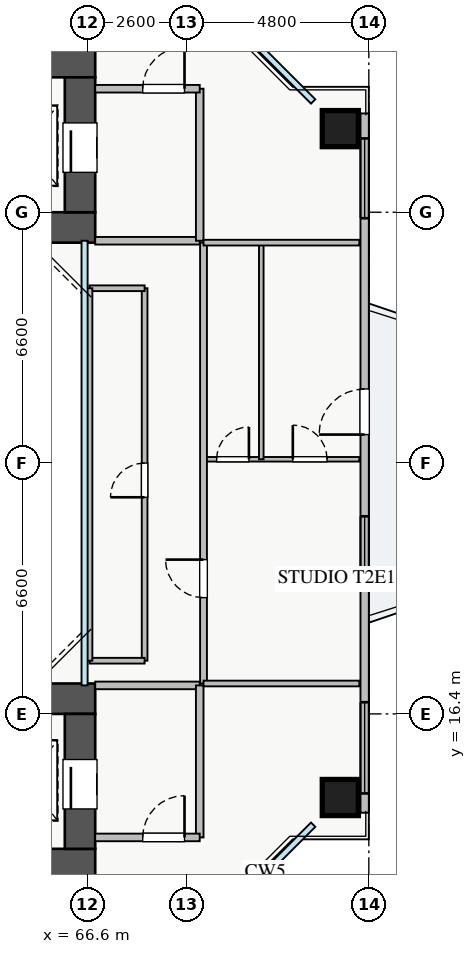
"""IFC4 building model, lengths in metres.
Left out: names, types, materials, properties, quantities, classifications, styles, units other than length and angle.
Written with IfcOpenShell. Run it as: python <this file> out.ifc"""

import sys

from ifc_helpers import new_model, si_unit, direction, frame, frame_2d, origin, origin_2d, place, context, subcontext, project, spatial, rectangle, extrude, source, transform, mapped, element, fill, save


model = new_model("IFC4")
c1 = context("Model", 3, precision=1e-05, world=origin(), true_north=direction((0.0, 1.0)))
c2 = subcontext(c1, "Body", "Model", "MODEL_VIEW")
j1 = project(units=[si_unit("LENGTHUNIT", "METRE"), si_unit("PLANEANGLEUNIT", "RADIAN")], contexts=[c1])
p1 = place(None, origin())
s1 = spatial("IfcSite", under=j1, at=p1, CompositionType="ELEMENT")
p2 = place(p1, origin())
s2 = spatial("IfcBuilding", under=s1, at=p2, CompositionType="ELEMENT")
p3 = place(p2, frame((0.0, 0.0, 56.75)))
s3 = spatial("IfcBuildingStorey", under=s2, at=p3, CompositionType="ELEMENT", Elevation=56.75)
p4 = place(p3, frame((54.2, 29.2, 0.0), z_axis=(0.0, 0.0, 1.0), x_axis=(1.0, 0.0, 0.0)))
e1 = element("IfcWall", 1, at=p4, inside=s3, PredefinedType="SHEAR", context=c2, shape_type="SweptSolid", body=[
    extrude(rectangle(XDim=12.6, YDim=0.8, at=frame_2d((6.3, 0.0))), origin(), (0.0, 0.0, 1.0), 3.25),
])
p5 = place(p3, frame((54.2, 33.55, 0.0), z_axis=(0.0, 0.0, 1.0), x_axis=(1.0, 0.0, 0.0)))
e2 = element("IfcWall", 2, at=p5, inside=s3, PredefinedType="SHEAR", context=c2, shape_type="SweptSolid", body=[
    extrude(rectangle(XDim=12.6, YDim=0.8, at=frame_2d((6.3, 0.0))), origin(), (0.0, 0.0, 1.0), 3.25),
])
p6 = place(p5, frame((8.2, 0.0, 0.0)))
e3 = element("IfcOpeningElement", 3, at=p6, cuts=e2, PredefinedType="OPENING", context=c2, shape_type="SweptSolid", body=[
    extrude(rectangle(XDim=1.1, YDim=2.05, at=frame_2d((0.55, 1.025))), frame((0.0, 0.41, 0.0), z_axis=(0.0, -1.0, 0.0), x_axis=(1.0, 0.0, 0.0)), (0.0, 0.0, 1.0), 0.82),
])
p7 = place(p3, frame((66.4, 29.6, 0.0), z_axis=(0.0, 0.0, 1.0), x_axis=(0.0, 1.0, 0.0)))
e4 = element("IfcWall", 4, at=p7, inside=s3, PredefinedType="SHEAR", context=c2, shape_type="SweptSolid", body=[
    extrude(rectangle(XDim=3.55, YDim=0.8, at=frame_2d((1.775, 0.0))), origin(), (0.0, 0.0, 1.0), 3.25),
])
p8 = place(p7, frame((1.05, 0.0, 0.0)))
e5 = element("IfcOpeningElement", 5, at=p8, cuts=e4, PredefinedType="OPENING", context=c2, shape_type="SweptSolid", body=[
    extrude(rectangle(XDim=1.3, YDim=2.05, at=frame_2d((0.65, 1.025))), frame((0.0, 0.41, 0.0), z_axis=(0.0, -1.0, 0.0), x_axis=(1.0, 0.0, 0.0)), (0.0, 0.0, 1.0), 0.82),
])
p9 = place(p3, frame((54.2, 12.45, 0.0), z_axis=(0.0, 0.0, 1.0), x_axis=(1.0, 0.0, 0.0)))
e6 = element("IfcWall", 6, at=p9, inside=s3, PredefinedType="SHEAR", context=c2, shape_type="SweptSolid", body=[
    extrude(rectangle(XDim=12.6, YDim=0.8, at=frame_2d((6.3, 0.0))), origin(), (0.0, 0.0, 1.0), 3.25),
])
p10 = place(p9, frame((8.2, 0.0, 0.0)))
e7 = element("IfcOpeningElement", 7, at=p10, cuts=e6, PredefinedType="OPENING", context=c2, shape_type="SweptSolid", body=[
    extrude(rectangle(XDim=1.1, YDim=2.05, at=frame_2d((0.55, 1.025))), frame((0.0, 0.41, 0.0), z_axis=(0.0, -1.0, 0.0), x_axis=(1.0, 0.0, 0.0)), (0.0, 0.0, 1.0), 0.82),
])
p11 = place(p3, frame((54.2, 16.8, 0.0), z_axis=(0.0, 0.0, 1.0), x_axis=(1.0, 0.0, 0.0)))
e8 = element("IfcWall", 8, at=p11, inside=s3, PredefinedType="SHEAR", context=c2, shape_type="SweptSolid", body=[
    extrude(rectangle(XDim=12.6, YDim=0.8, at=frame_2d((6.3, 0.0))), origin(), (0.0, 0.0, 1.0), 3.25),
])
p12 = place(p3, frame((66.4, 12.85, 0.0), z_axis=(0.0, 0.0, 1.0), x_axis=(0.0, 1.0, 0.0)))
e9 = element("IfcWall", 9, at=p12, inside=s3, PredefinedType="SHEAR", context=c2, shape_type="SweptSolid", body=[
    extrude(rectangle(XDim=3.55, YDim=0.8, at=frame_2d((1.775, 0.0))), origin(), (0.0, 0.0, 1.0), 3.25),
])
p13 = place(p12, frame((1.05, 0.0, 0.0)))
e10 = element("IfcOpeningElement", 10, at=p13, cuts=e9, PredefinedType="OPENING", context=c2, shape_type="SweptSolid", body=[
    extrude(rectangle(XDim=1.3, YDim=2.05, at=frame_2d((0.65, 1.025))), frame((0.0, 0.41, 0.0), z_axis=(0.0, -1.0, 0.0), x_axis=(1.0, 0.0, 0.0)), (0.0, 0.0, 1.0), 0.82),
])
m1 = source(origin(), c2, "Body", "SweptSolid", [
    extrude(rectangle(XDim=0.95, YDim=0.95, at=origin_2d()), origin(), (0.0, 0.0, 1.0), 3.25),
])
for number, where, z_axis, x_axis in (
    (11, (73.25, 14.2, 0.0), (0.0, 0.0, 1.0), (1.0, 0.0, 0.0)),
    (12, (73.25, 31.8, 0.0), (0.0, 0.0, 1.0), (1.0, 0.0, 0.0)),
):
    element("IfcColumn", number, at=place(p3, frame(where, z_axis=z_axis, x_axis=x_axis)), inside=s3, PredefinedType="COLUMN", context=c2, shape_type="MappedRepresentation", body=[
        mapped(m1, transform((0.0, 0.0, 0.0), x_axis=(1.0, 0.0, 0.0), y_axis=(0.0, 1.0, 0.0), z_axis=(0.0, 0.0, 1.0), scale=1.0)),
    ])
p14 = place(p3, frame((73.89, 13.8, 0.0), z_axis=(0.0, 0.0, 1.0), x_axis=(0.0, 1.0, 0.0)))
e13 = element("IfcWall", 13, at=p14, inside=s3, PredefinedType="STANDARD", context=c2, shape_type="SweptSolid", body=[
    extrude(rectangle(XDim=18.4, YDim=0.22, at=frame_2d((9.2, 0.0))), origin(), (0.0, 0.0, 1.0), 2.61),
])
p15 = place(p14, frame((9.95, 0.0, 0.0)))
e14 = element("IfcOpeningElement", 14, at=p15, cuts=e13, PredefinedType="OPENING", context=c2, shape_type="SweptSolid", body=[
    extrude(rectangle(XDim=1.2, YDim=2.1, at=frame_2d((0.6, 1.05))), frame((0.0, 0.12, 0.0), z_axis=(0.0, -1.0, 0.0), x_axis=(1.0, 0.0, 0.0)), (0.0, 0.0, 1.0), 0.24),
])
p16 = place(p14, frame((0.508, 0.0, 0.9)))
e15 = element("IfcOpeningElement", 15, at=p16, cuts=e13, PredefinedType="OPENING", context=c2, shape_type="SweptSolid", body=[
    extrude(rectangle(XDim=2.4, YDim=1.5, at=frame_2d((1.2, 0.75))), frame((0.0, 0.12, 0.0), z_axis=(0.0, -1.0, 0.0), x_axis=(1.0, 0.0, 0.0)), (0.0, 0.0, 1.0), 0.24),
])
p17 = place(p14, frame((6.0, 0.0, 0.9)))
e16 = element("IfcOpeningElement", 16, at=p17, cuts=e13, PredefinedType="OPENING", context=c2, shape_type="SweptSolid", body=[
    extrude(rectangle(XDim=1.8, YDim=1.45, at=frame_2d((0.9, 0.725))), frame((0.0, 0.12, 0.0), z_axis=(0.0, -1.0, 0.0), x_axis=(1.0, 0.0, 0.0)), (0.0, 0.0, 1.0), 0.24),
])
p18 = place(p14, frame((15.643, 0.0, 0.9)))
e17 = element("IfcOpeningElement", 17, at=p18, cuts=e13, PredefinedType="OPENING", context=c2, shape_type="SweptSolid", body=[
    extrude(rectangle(XDim=2.1, YDim=1.5, at=frame_2d((1.05, 0.75))), frame((0.0, 0.12, 0.0), z_axis=(0.0, -1.0, 0.0), x_axis=(1.0, 0.0, 0.0)), (0.0, 0.0, 1.0), 0.24),
])
p19 = place(p3, frame((66.8, 28.85, 0.0), z_axis=(0.0, 0.0, 1.0), x_axis=(1.0, 0.0, 0.0)))
e18 = element("IfcWall", 18, at=p19, inside=s3, PredefinedType="PARTITIONING", context=c2, shape_type="SweptSolid", body=[
    extrude(rectangle(XDim=2.75, YDim=0.2, at=frame_2d((1.375, 0.0))), origin(), (0.0, 0.0, 1.0), 3.07),
])
p20 = place(p3, frame((69.55, 28.85, 0.0), z_axis=(0.0, 0.0, 1.0), x_axis=(0.0, 1.0, 0.0)))
e19 = element("IfcWall", 19, at=p20, inside=s3, PredefinedType="PARTITIONING", context=c2, shape_type="SweptSolid", body=[
    extrude(rectangle(XDim=4.0, YDim=0.2, at=frame_2d((2.0, 0.0))), origin(), (0.0, 0.0, 1.0), 2.615),
])
p21 = place(p3, frame((66.8, 32.85, 0.0), z_axis=(0.0, 0.0, 1.0), x_axis=(1.0, 0.0, 0.0)))
e20 = element("IfcWall", 20, at=p21, inside=s3, PredefinedType="PARTITIONING", context=c2, shape_type="SweptSolid", body=[
    extrude(rectangle(XDim=2.75, YDim=0.2, at=frame_2d((1.375, 0.0))), origin(), (0.0, 0.0, 1.0), 3.07),
])
p22 = place(p21, frame((1.25, 0.0, 0.0)))
e21 = element("IfcOpeningElement", 21, at=p22, cuts=e20, PredefinedType="OPENING", context=c2, shape_type="SweptSolid", body=[
    extrude(rectangle(XDim=1.1, YDim=2.05, at=frame_2d((0.55, 1.025))), frame((0.0, 0.11, 0.0), z_axis=(0.0, -1.0, 0.0), x_axis=(1.0, 0.0, 0.0)), (0.0, 0.0, 1.0), 0.22),
])
p23 = place(p3, frame((66.8, 17.15, 0.0), z_axis=(0.0, 0.0, 1.0), x_axis=(1.0, 0.0, 0.0)))
e22 = element("IfcWall", 22, at=p23, inside=s3, PredefinedType="PARTITIONING", context=c2, shape_type="SweptSolid", body=[
    extrude(rectangle(XDim=2.75, YDim=0.2, at=frame_2d((1.375, 0.0))), origin(), (0.0, 0.0, 1.0), 3.07),
])
p24 = place(p3, frame((69.55, 13.15, 0.0), z_axis=(0.0, 0.0, 1.0), x_axis=(0.0, 1.0, 0.0)))
e23 = element("IfcWall", 23, at=p24, inside=s3, PredefinedType="PARTITIONING", context=c2, shape_type="SweptSolid", body=[
    extrude(rectangle(XDim=4.0, YDim=0.2, at=frame_2d((2.0, 0.0))), origin(), (0.0, 0.0, 1.0), 2.615),
])
p25 = place(p3, frame((66.8, 13.15, 0.0), z_axis=(0.0, 0.0, 1.0), x_axis=(1.0, 0.0, 0.0)))
e24 = element("IfcWall", 24, at=p25, inside=s3, PredefinedType="PARTITIONING", context=c2, shape_type="SweptSolid", body=[
    extrude(rectangle(XDim=2.75, YDim=0.2, at=frame_2d((1.375, 0.0))), origin(), (0.0, 0.0, 1.0), 3.07),
])
p26 = place(p25, frame((1.25, 0.0, 0.0)))
e25 = element("IfcOpeningElement", 25, at=p26, cuts=e24, PredefinedType="OPENING", context=c2, shape_type="SweptSolid", body=[
    extrude(rectangle(XDim=1.1, YDim=2.05, at=frame_2d((0.55, 1.025))), frame((0.0, 0.11, 0.0), z_axis=(0.0, -1.0, 0.0), x_axis=(1.0, 0.0, 0.0)), (0.0, 0.0, 1.0), 0.22),
])
p27 = place(p3, frame((69.65, 23.1, 0.0), z_axis=(0.0, 0.0, 1.0), x_axis=(1.0, 0.0, 0.0)))
e26 = element("IfcWall", 26, at=p27, inside=s3, PredefinedType="PLUMBINGWALL", context=c2, shape_type="SweptSolid", body=[
    extrude(rectangle(XDim=4.1, YDim=0.12, at=frame_2d((2.05, 0.0))), origin(), (0.0, 0.0, 1.0), 2.715),
])
p28 = place(p27, frame((0.345, 0.0, 0.0)))
e27 = element("IfcOpeningElement", 27, at=p28, cuts=e26, PredefinedType="OPENING", context=c2, shape_type="SweptSolid", body=[
    extrude(rectangle(XDim=0.85, YDim=2.05, at=frame_2d((0.425, 1.025))), frame((0.0, 0.07, 0.0), z_axis=(0.0, -1.0, 0.0), x_axis=(1.0, 0.0, 0.0)), (0.0, 0.0, 1.0), 0.14),
])
p29 = place(p27, frame((2.35, 0.0, 0.0)))
e28 = element("IfcOpeningElement", 28, at=p29, cuts=e26, PredefinedType="OPENING", context=c2, shape_type="SweptSolid", body=[
    extrude(rectangle(XDim=0.9, YDim=2.05, at=frame_2d((0.45, 1.025))), frame((0.0, 0.07, 0.0), z_axis=(0.0, -1.0, 0.0), x_axis=(1.0, 0.0, 0.0)), (0.0, 0.0, 1.0), 0.14),
])
p30 = place(p3, frame((71.17, 23.1, 0.0), z_axis=(0.0, 0.0, 1.0), x_axis=(0.0, 1.0, 0.0)))
e29 = element("IfcWall", 29, at=p30, inside=s3, PredefinedType="PLUMBINGWALL", context=c2, shape_type="SweptSolid", body=[
    extrude(rectangle(XDim=5.7, YDim=0.12, at=frame_2d((2.85, 0.0))), origin(), (0.0, 0.0, 1.0), 3.07),
])
p31 = place(p3, frame((69.65, 17.2, 0.0), z_axis=(0.0, 0.0, 1.0), x_axis=(0.0, 1.0, 0.0)))
e30 = element("IfcWall", 30, at=p31, inside=s3, PredefinedType="PARTITIONING", context=c2, shape_type="SweptSolid", body=[
    extrude(rectangle(XDim=11.6, YDim=0.18, at=frame_2d((5.8, 0.0))), origin(), (0.0, 0.0, 1.0), 3.07),
])
p32 = place(p31, frame((2.26, 0.0, 0.0)))
e31 = element("IfcOpeningElement", 31, at=p32, cuts=e30, PredefinedType="OPENING", context=c2, shape_type="SweptSolid", body=[
    extrude(rectangle(XDim=1.0, YDim=2.05, at=frame_2d((0.5, 1.025))), frame((0.0, 0.1, 0.0), z_axis=(0.0, -1.0, 0.0), x_axis=(1.0, 0.0, 0.0)), (0.0, 0.0, 1.0), 0.2),
])
for number, where, z_axis, x_axis in (
    (32, (69.65, 17.2, 0.0), (0.0, 0.0, 1.0), (1.0, 0.0, 0.0)),
    (33, (69.65, 28.8, 0.0), (0.0, 0.0, 1.0), (1.0, 0.0, 0.0)),
):
    element("IfcWall", number, at=place(p3, frame(where, z_axis=z_axis, x_axis=x_axis)), inside=s3, PredefinedType="PARTITIONING", context=c2, shape_type="SweptSolid", body=[
        extrude(rectangle(XDim=4.1, YDim=0.15, at=frame_2d((2.05, 0.0))), origin(), (0.0, 0.0, 1.0), 3.07),
    ])
p33 = place(p3, frame((68.1, 17.8, 0.0), z_axis=(0.0, 0.0, 1.0), x_axis=(0.0, 1.0, 0.0)))
e34 = element("IfcWall", 34, at=p33, inside=s3, PredefinedType="PARTITIONING", context=c2, shape_type="SweptSolid", body=[
    extrude(rectangle(XDim=9.8, YDim=0.15, at=frame_2d((4.9, 0.0))), origin(), (0.0, 0.0, 1.0), 3.07),
])
p34 = place(p33, frame((4.3, 0.0, 0.0)))
e35 = element("IfcOpeningElement", 35, at=p34, cuts=e34, PredefinedType="OPENING", context=c2, shape_type="SweptSolid", body=[
    extrude(rectangle(XDim=0.9, YDim=2.05, at=frame_2d((0.45, 1.025))), frame((0.0, 0.085, 0.0), z_axis=(0.0, -1.0, 0.0), x_axis=(1.0, 0.0, 0.0)), (0.0, 0.0, 1.0), 0.17),
])
p35 = place(p3, frame((66.65, 27.6, 0.0), z_axis=(0.0, 0.0, 1.0), x_axis=(1.0, 0.0, 0.0)))
e36 = element("IfcWall", 36, at=p35, inside=s3, PredefinedType="PARTITIONING", context=c2, shape_type="SweptSolid", body=[
    extrude(rectangle(XDim=1.45, YDim=0.15, at=frame_2d((0.725, 0.0))), origin(), (0.0, 0.0, 1.0), 2.715),
])
p36 = place(p3, frame((66.65, 17.8, 0.0), z_axis=(0.0, 0.0, 1.0), x_axis=(1.0, 0.0, 0.0)))
e37 = element("IfcWall", 37, at=p36, inside=s3, PredefinedType="PARTITIONING", context=c2, shape_type="SweptSolid", body=[
    extrude(rectangle(XDim=1.45, YDim=0.15, at=frame_2d((0.725, 0.0))), origin(), (0.0, 0.0, 1.0), 3.07),
])
p37 = place(p3, frame((66.65, 17.8, 0.0), z_axis=(0.0, 0.0, 1.0), x_axis=(0.0, 1.0, 0.0)))
e38 = element("IfcWall", 38, at=p37, inside=s3, PredefinedType="PARTITIONING", context=c2, shape_type="SweptSolid", body=[
    extrude(rectangle(XDim=9.8, YDim=0.15, at=frame_2d((4.9, 0.0))), origin(), (0.0, 0.0, 1.0), 2.665),
])
m2 = source(origin(), c2, "Body", "SweptSolid", [
    extrude(rectangle(XDim=1.2, YDim=2.1, at=frame_2d((0.6, 1.05))), frame((0.0, 0.025, 0.0), z_axis=(0.0, -1.0, 0.0), x_axis=(1.0, 0.0, 0.0)), (0.0, 0.0, 1.0), 0.05),
])
p38 = place(p15, origin())
e39 = element("IfcDoor", 39, at=p38, inside=s3, OperationType="SINGLE_SWING_LEFT", PredefinedType="DOOR", context=c2, shape_type="MappedRepresentation", body=[
    mapped(m2, transform((0.0, 0.0, 0.0), x_axis=(1.0, 0.0, 0.0), y_axis=(0.0, 1.0, 0.0), z_axis=(0.0, 0.0, 1.0), scale=1.0)),
])
fill(e14, e39)
m3 = source(origin(), c2, "Body", "SweptSolid", [
    extrude(rectangle(XDim=2.4, YDim=1.5, at=frame_2d((1.2, 0.75))), frame((0.0, 0.03, 0.0), z_axis=(0.0, -1.0, 0.0), x_axis=(1.0, 0.0, 0.0)), (0.0, 0.0, 1.0), 0.06),
])
p39 = place(p16, origin())
e40 = element("IfcWindow", 40, at=p39, inside=s3, PartitioningType="TRIPLE_PANEL_VERTICAL", PredefinedType="WINDOW", context=c2, shape_type="MappedRepresentation", body=[
    mapped(m3, transform((0.0, 0.0, 0.0), x_axis=(1.0, 0.0, 0.0), y_axis=(0.0, 1.0, 0.0), z_axis=(0.0, 0.0, 1.0), scale=1.0)),
])
fill(e15, e40)
m4 = source(origin(), c2, "Body", "SweptSolid", [
    extrude(rectangle(XDim=1.8, YDim=1.45, at=frame_2d((0.9, 0.725))), frame((0.0, 0.03, 0.0), z_axis=(0.0, -1.0, 0.0), x_axis=(1.0, 0.0, 0.0)), (0.0, 0.0, 1.0), 0.06),
])
p40 = place(p17, origin())
e41 = element("IfcWindow", 41, at=p40, inside=s3, PartitioningType="DOUBLE_PANEL_VERTICAL", PredefinedType="WINDOW", context=c2, shape_type="MappedRepresentation", body=[
    mapped(m4, transform((0.0, 0.0, 0.0), x_axis=(1.0, 0.0, 0.0), y_axis=(0.0, 1.0, 0.0), z_axis=(0.0, 0.0, 1.0), scale=1.0)),
])
fill(e16, e41)
m5 = source(origin(), c2, "Body", "SweptSolid", [
    extrude(rectangle(XDim=2.1, YDim=1.5, at=frame_2d((1.05, 0.75))), frame((0.0, 0.03, 0.0), z_axis=(0.0, -1.0, 0.0), x_axis=(1.0, 0.0, 0.0)), (0.0, 0.0, 1.0), 0.06),
])
p41 = place(p18, origin())
e42 = element("IfcWindow", 42, at=p41, inside=s3, PartitioningType="TRIPLE_PANEL_VERTICAL", PredefinedType="WINDOW", context=c2, shape_type="MappedRepresentation", body=[
    mapped(m5, transform((0.0, 0.0, 0.0), x_axis=(1.0, 0.0, 0.0), y_axis=(0.0, 1.0, 0.0), z_axis=(0.0, 0.0, 1.0), scale=1.0)),
])
fill(e17, e42)
m6 = source(origin(), c2, "Body", "SweptSolid", [
    extrude(rectangle(XDim=1.3, YDim=2.05, at=frame_2d((0.65, 1.025))), frame((0.0, 0.025, 0.0), z_axis=(0.0, -1.0, 0.0), x_axis=(1.0, 0.0, 0.0)), (0.0, 0.0, 1.0), 0.05),
])
p42 = place(p8, origin())
e43 = element("IfcDoor", 43, at=p42, inside=s3, OperationType="SLIDING_TO_LEFT", PredefinedType="DOOR", context=c2, shape_type="MappedRepresentation", body=[
    mapped(m6, transform((0.0, 0.0, 0.0), x_axis=(1.0, 0.0, 0.0), y_axis=(0.0, 1.0, 0.0), z_axis=(0.0, 0.0, 1.0), scale=1.0)),
])
fill(e5, e43)
p43 = place(p13, origin())
e44 = element("IfcDoor", 44, at=p43, inside=s3, OperationType="SLIDING_TO_RIGHT", PredefinedType="DOOR", context=c2, shape_type="MappedRepresentation", body=[
    mapped(m6, transform((0.0, 0.0, 0.0), x_axis=(1.0, 0.0, 0.0), y_axis=(0.0, 1.0, 0.0), z_axis=(0.0, 0.0, 1.0), scale=1.0)),
])
fill(e10, e44)
m7 = source(origin(), c2, "Body", "SweptSolid", [
    extrude(rectangle(XDim=1.1, YDim=2.05, at=frame_2d((0.55, 1.025))), frame((0.0, 0.025, 0.0), z_axis=(0.0, -1.0, 0.0), x_axis=(1.0, 0.0, 0.0)), (0.0, 0.0, 1.0), 0.05),
])
p44 = place(p22, origin())
e45 = element("IfcDoor", 45, at=p44, inside=s3, OperationType="SINGLE_SWING_RIGHT", PredefinedType="DOOR", context=c2, shape_type="MappedRepresentation", body=[
    mapped(m7, transform((0.0, 0.0, 0.0), x_axis=(1.0, 0.0, 0.0), y_axis=(0.0, 1.0, 0.0), z_axis=(0.0, 0.0, 1.0), scale=1.0)),
])
fill(e21, e45)
p45 = place(p26, origin())
e46 = element("IfcDoor", 46, at=p45, inside=s3, OperationType="SINGLE_SWING_RIGHT", PredefinedType="DOOR", context=c2, shape_type="MappedRepresentation", body=[
    mapped(m7, transform((0.0, 0.0, 0.0), x_axis=(1.0, 0.0, 0.0), y_axis=(0.0, 1.0, 0.0), z_axis=(0.0, 0.0, 1.0), scale=1.0)),
])
fill(e25, e46)
m8 = source(origin(), c2, "Body", "SweptSolid", [
    extrude(rectangle(XDim=0.85, YDim=2.05, at=frame_2d((0.425, 1.025))), frame((0.0, 0.025, 0.0), z_axis=(0.0, -1.0, 0.0), x_axis=(1.0, 0.0, 0.0)), (0.0, 0.0, 1.0), 0.05),
])
p46 = place(p28, origin())
e47 = element("IfcDoor", 47, at=p46, inside=s3, OperationType="SINGLE_SWING_RIGHT", PredefinedType="DOOR", context=c2, shape_type="MappedRepresentation", body=[
    mapped(m8, transform((0.0, 0.0, 0.0), x_axis=(1.0, 0.0, 0.0), y_axis=(0.0, 1.0, 0.0), z_axis=(0.0, 0.0, 1.0), scale=1.0)),
])
fill(e27, e47)
m9 = source(origin(), c2, "Body", "SweptSolid", [
    extrude(rectangle(XDim=0.9, YDim=2.05, at=frame_2d((0.45, 1.025))), frame((0.0, 0.025, 0.0), z_axis=(0.0, -1.0, 0.0), x_axis=(1.0, 0.0, 0.0)), (0.0, 0.0, 1.0), 0.05),
])
p47 = place(p29, origin())
e48 = element("IfcDoor", 48, at=p47, inside=s3, OperationType="SINGLE_SWING_LEFT", PredefinedType="DOOR", context=c2, shape_type="MappedRepresentation", body=[
    mapped(m9, transform((0.0, 0.0, 0.0), x_axis=(1.0, 0.0, 0.0), y_axis=(0.0, 1.0, 0.0), z_axis=(0.0, 0.0, 1.0), scale=1.0)),
])
fill(e28, e48)
m10 = source(origin(), c2, "Body", "SweptSolid", [
    extrude(rectangle(XDim=1.0, YDim=2.05, at=frame_2d((0.5, 1.025))), frame((0.0, 0.025, 0.0), z_axis=(0.0, -1.0, 0.0), x_axis=(1.0, 0.0, 0.0)), (0.0, 0.0, 1.0), 0.05),
])
p48 = place(p32, origin())
e49 = element("IfcDoor", 49, at=p48, inside=s3, OperationType="SINGLE_SWING_RIGHT", PredefinedType="DOOR", context=c2, shape_type="MappedRepresentation", body=[
    mapped(m10, transform((0.0, 0.0, 0.0), x_axis=(1.0, 0.0, 0.0), y_axis=(0.0, 1.0, 0.0), z_axis=(0.0, 0.0, 1.0), scale=1.0)),
])
fill(e31, e49)
p49 = place(p34, origin())
e50 = element("IfcDoor", 50, at=p49, inside=s3, OperationType="SINGLE_SWING_LEFT", PredefinedType="DOOR", context=c2, shape_type="MappedRepresentation", body=[
    mapped(m9, transform((0.0, 0.0, 0.0), x_axis=(1.0, 0.0, 0.0), y_axis=(0.0, 1.0, 0.0), z_axis=(0.0, 0.0, 1.0), scale=1.0)),
])
fill(e35, e50)
save(model, sys.argv[1])
